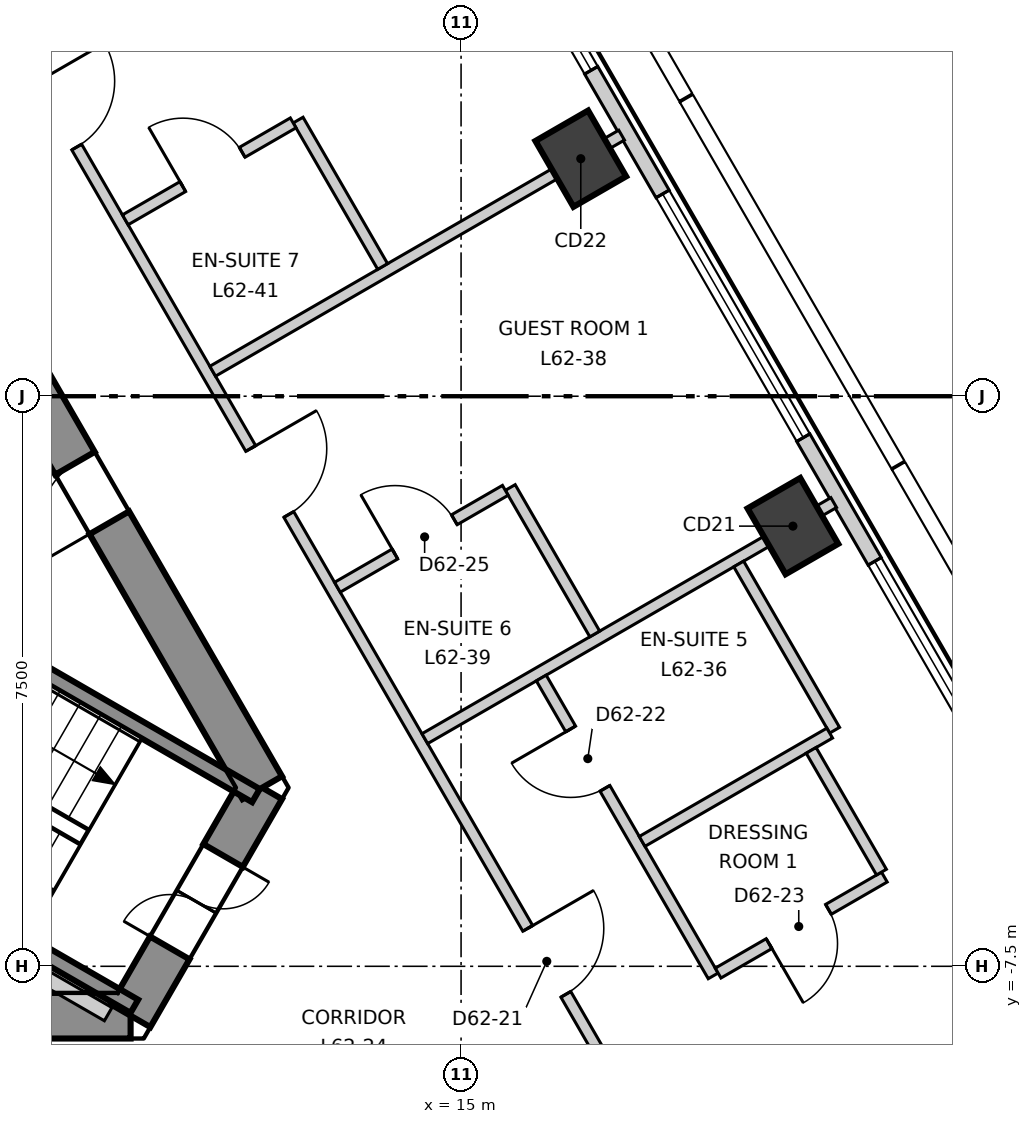
"""IFC4 building model, lengths in metres.
Left out: names, types, materials, properties, quantities, classifications, styles, units other than length and angle.
Written with IfcOpenShell. Run it as: python <this file> out.ifc"""

import sys

from ifc_helpers import new_model, si_unit, direction, frame, frame_2d, origin, origin_2d, place, context, subcontext, project, spatial, polyline, rectangle, outline, extrude, element, fill, save


model = new_model("IFC4")
c1 = context("Model", 3, precision=1e-05, world=origin(), true_north=direction((0.0, 1.0)))
c2 = subcontext(c1, "Body", "Model", "MODEL_VIEW")
j1 = project(units=[si_unit("LENGTHUNIT", "METRE"), si_unit("PLANEANGLEUNIT", "RADIAN")], contexts=[c1])
p1 = place(None, origin())
s1 = spatial("IfcSite", under=j1, at=p1, CompositionType="ELEMENT")
p2 = place(p1, origin())
s2 = spatial("IfcBuilding", under=s1, at=p2, CompositionType="ELEMENT")
p3 = place(p2, frame((0.0, 0.0, 268.3)))
s3 = spatial("IfcBuildingStorey", under=s2, at=p3, CompositionType="ELEMENT", Elevation=268.3)
p4 = place(p3, frame((-10.652, -8.15, -0.3), z_axis=(0.0, 0.0, 1.0), x_axis=(1.0, 0.0, 0.0)))
e1 = element("IfcWall", 1, at=p4, inside=s3, PredefinedType="SHEAR", context=c2, shape_type="SweptSolid", body=[
    extrude(outline(polyline([(-0.173, -0.3), (1.795, -0.3), (3.763, -0.3), (5.731, -0.3), (7.7, -0.3), (9.668, -0.3), (11.636, -0.3), (13.604, -0.3), (15.573, -0.3), (17.541, -0.3), (19.509, -0.3), (21.477, -0.3), (21.131, 0.3), (19.226, 0.3), (17.321, 0.3), (15.415, 0.3), (13.51, 0.3), (11.605, 0.3), (9.699, 0.3), (7.794, 0.3), (5.889, 0.3), (3.984, 0.3), (2.078, 0.3), (0.173, 0.3), (-0.173, -0.3)])), origin(), (0.0, 0.0, 1.0), 3.6),
])
p5 = place(p4, frame((9.752, 0.0, 0.3)))
e2 = element("IfcOpeningElement", 2, at=p5, cuts=e1, PredefinedType="OPENING", context=c2, shape_type="SweptSolid", body=[
    extrude(rectangle(XDim=1.8, YDim=2.1, at=frame_2d((0.9, 1.05))), frame((0.0, 0.31, 0.0), z_axis=(0.0, -1.0, 0.0), x_axis=(1.0, 0.0, 0.0)), (0.0, 0.0, 1.0), 0.62),
])
p6 = place(p4, frame((4.026, 0.0, 0.3)))
e3 = element("IfcOpeningElement", 3, at=p6, cuts=e1, PredefinedType="OPENING", context=c2, shape_type="SweptSolid", body=[
    extrude(rectangle(XDim=0.9, YDim=2.1, at=frame_2d((0.45, 1.05))), frame((0.0, 0.31, 0.0), z_axis=(0.0, -1.0, 0.0), x_axis=(1.0, 0.0, 0.0)), (0.0, 0.0, 1.0), 0.62),
])
p7 = place(p4, frame((16.198, 0.0, 0.3)))
e4 = element("IfcOpeningElement", 4, at=p7, cuts=e1, PredefinedType="OPENING", context=c2, shape_type="SweptSolid", body=[
    extrude(rectangle(XDim=1.0, YDim=2.1, at=frame_2d((0.5, 1.05))), frame((0.0, 0.31, 0.0), z_axis=(0.0, -1.0, 0.0), x_axis=(1.0, 0.0, 0.0)), (0.0, 0.0, 1.0), 0.62),
])
p8 = place(p3, frame((10.652, -8.15, -0.3), z_axis=(0.0, 0.0, 1.0), x_axis=(0.49997462182, 0.866040055388, 0.0)))
e5 = element("IfcWall", 5, at=p8, inside=s3, PredefinedType="SHEAR", context=c2, shape_type="SweptSolid", body=[
    extrude(outline(polyline([(-0.173, -0.3), (1.732, -0.301), (3.638, -0.301), (3.291, 0.3), (1.732, 0.3), (0.173, 0.3), (-0.173, -0.3)])), origin(), (0.0, 0.0, 1.0), 3.6),
])
p9 = place(p8, frame((1.032, 0.0, 0.3)))
e6 = element("IfcOpeningElement", 6, at=p9, cuts=e5, PredefinedType="OPENING", context=c2, shape_type="SweptSolid", body=[
    extrude(rectangle(XDim=1.4, YDim=2.1, at=frame_2d((0.7, 1.05))), frame((0.0, 0.31, 0.0), z_axis=(0.0, -1.0, 0.0), x_axis=(1.0, 0.0, 0.0)), (0.0, 0.0, 1.0), 0.621),
])
p10 = place(p3, frame((12.384, -5.15, -0.3), z_axis=(0.0, 0.0, 1.0), x_axis=(-0.500000539815, 0.866025092122, 0.0)))
e7 = element("IfcWall", 7, at=p10, inside=s3, PredefinedType="SHEAR", context=c2, shape_type="SweptSolid", body=[
    extrude(outline(polyline([(-0.173, -0.301), (1.795, -0.301), (3.763, -0.301), (5.731, -0.301), (7.7, -0.301), (9.668, -0.301), (11.636, -0.301), (13.604, -0.3), (15.573, -0.3), (17.541, -0.3), (19.509, -0.3), (21.477, -0.3), (21.131, 0.3), (19.226, 0.3), (17.321, 0.3), (15.415, 0.3), (13.51, 0.3), (11.605, 0.3), (9.699, 0.3), (7.794, 0.3), (5.889, 0.3), (3.984, 0.3), (2.078, 0.3), (0.173, 0.3), (-0.173, -0.301)])), origin(), (0.0, 0.0, 1.0), 3.6),
])
p11 = place(p10, frame((15.627, 0.0, 0.3)))
e8 = element("IfcOpeningElement", 8, at=p11, cuts=e7, PredefinedType="OPENING", context=c2, shape_type="SweptSolid", body=[
    extrude(rectangle(XDim=0.9, YDim=2.1, at=frame_2d((0.45, 1.05))), frame((0.0, 0.31, 0.0), z_axis=(0.0, -1.0, 0.0), x_axis=(1.0, 0.0, 0.0)), (0.0, 0.0, 1.0), 0.621),
])
p12 = place(p10, frame((4.026, 0.0, 0.3)))
e9 = element("IfcOpeningElement", 9, at=p12, cuts=e7, PredefinedType="OPENING", context=c2, shape_type="SweptSolid", body=[
    extrude(rectangle(XDim=0.9, YDim=2.1, at=frame_2d((0.45, 1.05))), frame((0.0, 0.31, 0.0), z_axis=(0.0, -1.0, 0.0), x_axis=(1.0, 0.0, 0.0)), (0.0, 0.0, 1.0), 0.621),
])
for number, where, z_axis, x_axis in (
    (10, (19.366, -1.709, -0.3), (0.0, 0.0, 1.0), (-0.5, 0.866, 0.0)),
    (11, (16.575, 3.125, -0.3), (0.0, 0.0, 1.0), (-0.5, 0.866, 0.0)),
):
    element("IfcColumn", number, at=place(p3, frame(where, z_axis=z_axis, x_axis=x_axis)), inside=s3, PredefinedType="COLUMN", context=c2, shape_type="SweptSolid", body=[
        extrude(rectangle(XDim=1.0, YDim=0.8, at=origin_2d()), origin(), (0.0, 0.0, 1.0), 3.6),
    ])
p13 = place(p3, frame((26.205, -12.154, 0.0), z_axis=(0.0, 0.0, 1.0), x_axis=(-0.49999909388, 0.866025926932, 0.0)))
e12 = element("IfcWall", 12, at=p13, inside=s3, PredefinedType="ELEMENTEDWALL", context=c2, shape_type="SweptSolid", body=[
    extrude(rectangle(XDim=47.236, YDim=0.2, at=frame_2d((23.618, 0.0))), origin(), (0.0, 0.0, 1.0), 3.3),
])
p14 = place(p13, frame((2.243, 0.0, 0.9)))
e13 = element("IfcOpeningElement", 13, at=p14, cuts=e12, PredefinedType="OPENING", context=c2, shape_type="SweptSolid", body=[
    extrude(rectangle(XDim=3.7, YDim=2.2, at=frame_2d((1.85, 1.1))), frame((0.0, 0.11, 0.0), z_axis=(0.0, -1.0, 0.0), x_axis=(1.0, 0.0, 0.0)), (0.0, 0.0, 1.0), 0.22),
])
p15 = place(p13, frame((7.825, 0.0, 0.9)))
e14 = element("IfcOpeningElement", 14, at=p15, cuts=e12, PredefinedType="OPENING", context=c2, shape_type="SweptSolid", body=[
    extrude(rectangle(XDim=3.7, YDim=2.2, at=frame_2d((1.85, 1.1))), frame((0.0, 0.11, 0.0), z_axis=(0.0, -1.0, 0.0), x_axis=(1.0, 0.0, 0.0)), (0.0, 0.0, 1.0), 0.22),
])
p16 = place(p13, frame((13.406, 0.0, 0.9)))
e15 = element("IfcOpeningElement", 15, at=p16, cuts=e12, PredefinedType="OPENING", context=c2, shape_type="SweptSolid", body=[
    extrude(rectangle(XDim=3.7, YDim=2.2, at=frame_2d((1.85, 1.1))), frame((0.0, 0.11, 0.0), z_axis=(0.0, -1.0, 0.0), x_axis=(1.0, 0.0, 0.0)), (0.0, 0.0, 1.0), 0.22),
])
p17 = place(p13, frame((18.987, 0.0, 0.9)))
e16 = element("IfcOpeningElement", 16, at=p17, cuts=e12, PredefinedType="OPENING", context=c2, shape_type="SweptSolid", body=[
    extrude(rectangle(XDim=3.7, YDim=2.2, at=frame_2d((1.85, 1.1))), frame((0.0, 0.11, 0.0), z_axis=(0.0, -1.0, 0.0), x_axis=(1.0, 0.0, 0.0)), (0.0, 0.0, 1.0), 0.22),
])
p18 = place(p13, frame((24.569, 0.0, 0.9)))
e17 = element("IfcOpeningElement", 17, at=p18, cuts=e12, PredefinedType="OPENING", context=c2, shape_type="SweptSolid", body=[
    extrude(rectangle(XDim=3.7, YDim=2.2, at=frame_2d((1.85, 1.1))), frame((0.0, 0.11, 0.0), z_axis=(0.0, -1.0, 0.0), x_axis=(1.0, 0.0, 0.0)), (0.0, 0.0, 1.0), 0.22),
])
p19 = place(p13, frame((30.15, 0.0, 0.9)))
e18 = element("IfcOpeningElement", 18, at=p19, cuts=e12, PredefinedType="OPENING", context=c2, shape_type="SweptSolid", body=[
    extrude(rectangle(XDim=3.7, YDim=2.2, at=frame_2d((1.85, 1.1))), frame((0.0, 0.11, 0.0), z_axis=(0.0, -1.0, 0.0), x_axis=(1.0, 0.0, 0.0)), (0.0, 0.0, 1.0), 0.22),
])
p20 = place(p13, frame((35.732, 0.0, 0.9)))
e19 = element("IfcOpeningElement", 19, at=p20, cuts=e12, PredefinedType="OPENING", context=c2, shape_type="SweptSolid", body=[
    extrude(rectangle(XDim=3.7, YDim=2.2, at=frame_2d((1.85, 1.1))), frame((0.0, 0.11, 0.0), z_axis=(0.0, -1.0, 0.0), x_axis=(1.0, 0.0, 0.0)), (0.0, 0.0, 1.0), 0.22),
])
p21 = place(p13, frame((41.313, 0.0, 0.9)))
e20 = element("IfcOpeningElement", 20, at=p21, cuts=e12, PredefinedType="OPENING", context=c2, shape_type="SweptSolid", body=[
    extrude(rectangle(XDim=3.7, YDim=2.2, at=frame_2d((1.85, 1.1))), frame((0.0, 0.11, 0.0), z_axis=(0.0, -1.0, 0.0), x_axis=(1.0, 0.0, 0.0)), (0.0, 0.0, 1.0), 0.22),
])
p22 = place(p3, frame((0.075, 20.37, 0.0), z_axis=(0.0, 0.0, 1.0), x_axis=(0.499988971979, -0.866031770721, 0.0)))
e21 = element("IfcWall", 21, at=p22, inside=s3, PredefinedType="PARTITIONING", context=c2, shape_type="SweptSolid", body=[
    extrude(rectangle(XDim=35.207, YDim=0.15, at=frame_2d((17.604, 0.0))), origin(), (0.0, 0.0, 1.0), 3.3),
])
p23 = place(p22, frame((31.606, 0.0, 0.0)))
e22 = element("IfcOpeningElement", 22, at=p23, cuts=e21, PredefinedType="OPENING", context=c2, shape_type="SweptSolid", body=[
    extrude(rectangle(XDim=1.0, YDim=2.1, at=frame_2d((0.5, 1.05))), frame((0.0, 0.085, 0.0), z_axis=(0.0, -1.0, 0.0), x_axis=(1.0, 0.0, 0.0)), (0.0, 0.0, 1.0), 0.17),
])
p24 = place(p22, frame((24.316, 0.0, 0.0)))
e23 = element("IfcOpeningElement", 23, at=p24, cuts=e21, PredefinedType="OPENING", context=c2, shape_type="SweptSolid", body=[
    extrude(rectangle(XDim=1.0, YDim=2.1, at=frame_2d((0.5, 1.05))), frame((0.0, 0.085, 0.0), z_axis=(0.0, -1.0, 0.0), x_axis=(1.0, 0.0, 0.0)), (0.0, 0.0, 1.0), 0.17),
])
p25 = place(p22, frame((18.735, 0.0, 0.0)))
e24 = element("IfcOpeningElement", 24, at=p25, cuts=e21, PredefinedType="OPENING", context=c2, shape_type="SweptSolid", body=[
    extrude(rectangle(XDim=1.0, YDim=2.1, at=frame_2d((0.5, 1.05))), frame((0.0, 0.085, 0.0), z_axis=(0.0, -1.0, 0.0), x_axis=(1.0, 0.0, 0.0)), (0.0, 0.0, 1.0), 0.17),
])
p26 = place(p22, frame((8.154, 0.0, 0.0)))
e25 = element("IfcOpeningElement", 25, at=p26, cuts=e21, PredefinedType="OPENING", context=c2, shape_type="SweptSolid", body=[
    extrude(rectangle(XDim=1.0, YDim=2.1, at=frame_2d((0.5, 1.05))), frame((0.0, 0.085, 0.0), z_axis=(0.0, -1.0, 0.0), x_axis=(1.0, 0.0, 0.0)), (0.0, 0.0, 1.0), 0.17),
])
p27 = place(p22, frame((13.754, 0.0, 0.0)))
e26 = element("IfcOpeningElement", 26, at=p27, cuts=e21, PredefinedType="OPENING", context=c2, shape_type="SweptSolid", body=[
    extrude(rectangle(XDim=0.9, YDim=2.1, at=frame_2d((0.45, 1.05))), frame((0.0, 0.085, 0.0), z_axis=(0.0, -1.0, 0.0), x_axis=(1.0, 0.0, 0.0)), (0.0, 0.0, 1.0), 0.17),
])
p28 = place(p22, frame((11.554, 0.0, 0.0)))
e27 = element("IfcOpeningElement", 27, at=p28, cuts=e21, PredefinedType="OPENING", context=c2, shape_type="SweptSolid", body=[
    extrude(rectangle(XDim=0.9, YDim=2.1, at=frame_2d((0.45, 1.05))), frame((0.0, 0.085, 0.0), z_axis=(0.0, -1.0, 0.0), x_axis=(1.0, 0.0, 0.0)), (0.0, 0.0, 1.0), 0.17),
])
p29 = place(p22, frame((2.69, 0.0, 0.0)))
e28 = element("IfcOpeningElement", 28, at=p29, cuts=e21, PredefinedType="OPENING", context=c2, shape_type="SweptSolid", body=[
    extrude(rectangle(XDim=1.0, YDim=2.1, at=frame_2d((0.5, 1.05))), frame((0.0, 0.085, 0.0), z_axis=(0.0, -1.0, 0.0), x_axis=(1.0, 0.0, 0.0)), (0.0, 0.0, 1.0), 0.17),
])
for number, where, z_axis, x_axis in (
    (29, (11.732, 0.329, 0.0), (0.0, 0.0, 1.0), (0.866, 0.5, 0.0)),
    (30, (14.523, -4.505, 0.0), (0.0, 0.0, 1.0), (0.866, 0.5, 0.0)),
):
    element("IfcWall", number, at=place(p3, frame(where, z_axis=z_axis, x_axis=x_axis)), inside=s3, PredefinedType="PARTITIONING", context=c2, shape_type="SweptSolid", body=[
        extrude(rectangle(XDim=6.212, YDim=0.15, at=frame_2d((3.106, 0.0))), origin(), (0.0, 0.0, 1.0), 3.3),
    ])
p30 = place(p3, frame((18.653, -2.207, 0.0), z_axis=(0.0, 0.0, 1.0), x_axis=(0.499789415832, -0.866146950478, 0.0)))
e31 = element("IfcWall", 31, at=p30, inside=s3, PredefinedType="PARTITIONING", context=c2, shape_type="SweptSolid", body=[
    extrude(rectangle(XDim=2.525, YDim=0.15, at=frame_2d((1.262, 0.0))), origin(), (0.0, 0.0, 1.0), 3.3),
])
p31 = place(p3, frame((16.055, -3.707, 0.0), z_axis=(0.0, 0.0, 1.0), x_axis=(0.499893710643, -0.866086761277, 0.0)))
e32 = element("IfcWall", 32, at=p31, inside=s3, PredefinedType="PARTITIONING", context=c2, shape_type="SweptSolid", body=[
    extrude(rectangle(XDim=4.525, YDim=0.15, at=frame_2d((2.262, 0.0))), origin(), (0.0, 0.0, 1.0), 3.3),
])
p32 = place(p31, frame((0.775, 0.0, 0.0)))
e33 = element("IfcOpeningElement", 33, at=p32, cuts=e32, PredefinedType="OPENING", context=c2, shape_type="SweptSolid", body=[
    extrude(rectangle(XDim=0.9, YDim=2.1, at=frame_2d((0.45, 1.05))), frame((0.0, 0.085, 0.0), z_axis=(0.0, -1.0, 0.0), x_axis=(1.0, 0.0, 0.0)), (0.0, 0.0, 1.0), 0.17),
])
p33 = place(p3, frame((12.856, 3.633, 0.0), z_axis=(0.0, 0.0, 1.0), x_axis=(0.500023359282, -0.866011916877, 0.0)))
e34 = element("IfcWall", 34, at=p33, inside=s3, PredefinedType="PARTITIONING", context=c2, shape_type="SweptSolid", body=[
    extrude(rectangle(XDim=2.224, YDim=0.15, at=frame_2d((1.112, 0.0))), origin(), (0.0, 0.0, 1.0), 3.3),
])
p34 = place(p3, frame((15.647, -1.201, 0.0), z_axis=(0.0, 0.0, 1.0), x_axis=(0.499833278392, -0.866121639155, 0.0)))
e35 = element("IfcWall", 35, at=p34, inside=s3, PredefinedType="PARTITIONING", context=c2, shape_type="SweptSolid", body=[
    extrude(rectangle(XDim=2.225, YDim=0.15, at=frame_2d((1.112, 0.0))), origin(), (0.0, 0.0, 1.0), 3.3),
])
p35 = place(p3, frame((10.582, 2.321, 0.0), z_axis=(0.0, 0.0, 1.0), x_axis=(0.866102706185, 0.499866084405, 0.0)))
e36 = element("IfcWall", 36, at=p35, inside=s3, PredefinedType="PARTITIONING", context=c2, shape_type="SweptSolid", body=[
    extrude(rectangle(XDim=2.551, YDim=0.15, at=frame_2d((1.275, 0.0))), origin(), (0.0, 0.0, 1.0), 3.3),
])
p36 = place(p35, frame((0.875, 0.0, 0.0)))
e37 = element("IfcOpeningElement", 37, at=p36, cuts=e36, PredefinedType="OPENING", context=c2, shape_type="SweptSolid", body=[
    extrude(rectangle(XDim=0.9, YDim=2.1, at=frame_2d((0.45, 1.05))), frame((0.0, 0.085, 0.0), z_axis=(0.0, -1.0, 0.0), x_axis=(1.0, 0.0, 0.0)), (0.0, 0.0, 1.0), 0.17),
])
p37 = place(p3, frame((13.373, -2.513, 0.0), z_axis=(0.0, 0.0, 1.0), x_axis=(0.866102706185, 0.499866084405, 0.0)))
e38 = element("IfcWall", 38, at=p37, inside=s3, PredefinedType="PARTITIONING", context=c2, shape_type="SweptSolid", body=[
    extrude(rectangle(XDim=2.551, YDim=0.15, at=frame_2d((1.275, 0.0))), origin(), (0.0, 0.0, 1.0), 3.3),
])
p38 = place(p37, frame((0.875, 0.0, 0.0)))
e39 = element("IfcOpeningElement", 39, at=p38, cuts=e38, PredefinedType="OPENING", context=c2, shape_type="SweptSolid", body=[
    extrude(rectangle(XDim=0.9, YDim=2.1, at=frame_2d((0.45, 1.05))), frame((0.0, 0.085, 0.0), z_axis=(0.0, -1.0, 0.0), x_axis=(1.0, 0.0, 0.0)), (0.0, 0.0, 1.0), 0.17),
])
p39 = place(p3, frame((17.382, -5.857, 0.0), z_axis=(0.0, 0.0, 1.0), x_axis=(0.866004402611, 0.500036373335, 0.0)))
e40 = element("IfcWall", 40, at=p39, inside=s3, PredefinedType="PARTITIONING", context=c2, shape_type="SweptSolid", body=[
    extrude(rectangle(XDim=2.85, YDim=0.15, at=frame_2d((1.425, 0.0))), origin(), (0.0, 0.0, 1.0), 3.3),
])
p40 = place(p3, frame((18.382, -7.589, 0.0), z_axis=(0.0, 0.0, 1.0), x_axis=(0.86593764446, 0.500151972811, 0.0)))
e41 = element("IfcWall", 41, at=p40, inside=s3, PredefinedType="PARTITIONING", context=c2, shape_type="SweptSolid", body=[
    extrude(rectangle(XDim=2.526, YDim=0.15, at=frame_2d((1.263, 0.0))), origin(), (0.0, 0.0, 1.0), 3.3),
])
p41 = place(p40, frame((0.775, 0.0, 0.0)))
e42 = element("IfcOpeningElement", 42, at=p41, cuts=e41, PredefinedType="OPENING", context=c2, shape_type="SweptSolid", body=[
    extrude(rectangle(XDim=0.9, YDim=2.1, at=frame_2d((0.45, 1.05))), frame((0.0, 0.085, 0.0), z_axis=(0.0, -1.0, 0.0), x_axis=(1.0, 0.0, 0.0)), (0.0, 0.0, 1.0), 0.17),
])
p42 = place(p3, frame((19.606, -4.659, 0.0), z_axis=(0.0, 0.0, 1.0), x_axis=(0.500042316284, -0.866000971088, 0.0)))
e43 = element("IfcWall", 43, at=p42, inside=s3, PredefinedType="PARTITIONING", context=c2, shape_type="SweptSolid", body=[
    extrude(rectangle(XDim=1.85, YDim=0.15, at=frame_2d((0.925, 0.0))), origin(), (0.0, 0.0, 1.0), 3.3),
])
p43 = place(p3, frame((4.9, -4.98, 0.0), z_axis=(0.0, 0.0, 1.0), x_axis=(0.866074613031, -0.499914757397, 0.0)))
e44 = element("IfcWall", 44, at=p43, inside=s3, PredefinedType="SOLIDWALL", context=c2, shape_type="SweptSolid", body=[
    extrude(rectangle(XDim=6.301, YDim=0.2, at=frame_2d((3.15, 0.0))), origin(), (0.0, 0.0, 1.0), 3.3),
])
p44 = place(p3, frame((4.929, -4.693, 0.0), z_axis=(0.0, 0.0, 1.0), x_axis=(0.866005022404, -0.500035299925, 0.0)))
e45 = element("IfcWall", 45, at=p44, inside=s3, PredefinedType="SOLIDWALL", context=c2, shape_type="SweptSolid", body=[
    extrude(rectangle(XDim=6.665, YDim=0.2, at=frame_2d((3.333, 0.0))), origin(), (0.0, 0.0, 1.0), 3.3),
])
p45 = place(p3, frame((6.529, -1.922, 0.0), z_axis=(0.0, 0.0, 1.0), x_axis=(0.866068467981, -0.499925403204, 0.0)))
e46 = element("IfcWall", 46, at=p45, inside=s3, PredefinedType="SOLIDWALL", context=c2, shape_type="SweptSolid", body=[
    extrude(rectangle(XDim=6.665, YDim=0.2, at=frame_2d((3.332, 0.0))), origin(), (0.0, 0.0, 1.0), 3.3),
])
p46 = place(p15, origin())
e47 = element("IfcWindow", 47, at=p46, inside=s3, PartitioningType="SINGLE_PANEL", PredefinedType="WINDOW", context=c2, shape_type="SweptSolid", body=[
    extrude(rectangle(XDim=3.7, YDim=2.2, at=frame_2d((1.85, 1.1))), frame((0.0, 0.03, 0.0), z_axis=(0.0, -1.0, 0.0), x_axis=(1.0, 0.0, 0.0)), (0.0, 0.0, 1.0), 0.06),
])
fill(e14, e47)
p47 = place(p16, origin())
e48 = element("IfcWindow", 48, at=p47, inside=s3, PartitioningType="SINGLE_PANEL", PredefinedType="WINDOW", context=c2, shape_type="SweptSolid", body=[
    extrude(rectangle(XDim=3.7, YDim=2.2, at=frame_2d((1.85, 1.1))), frame((0.0, 0.03, 0.0), z_axis=(0.0, -1.0, 0.0), x_axis=(1.0, 0.0, 0.0)), (0.0, 0.0, 1.0), 0.06),
])
fill(e15, e48)
p48 = place(p17, origin())
e49 = element("IfcWindow", 49, at=p48, inside=s3, PartitioningType="SINGLE_PANEL", PredefinedType="WINDOW", context=c2, shape_type="SweptSolid", body=[
    extrude(rectangle(XDim=3.7, YDim=2.2, at=frame_2d((1.85, 1.1))), frame((0.0, 0.03, 0.0), z_axis=(0.0, -1.0, 0.0), x_axis=(1.0, 0.0, 0.0)), (0.0, 0.0, 1.0), 0.06),
])
fill(e16, e49)
p49 = place(p23, origin())
e50 = element("IfcDoor", 50, at=p49, inside=s3, OperationType="SINGLE_SWING_RIGHT", PredefinedType="DOOR", context=c2, shape_type="SweptSolid", body=[
    extrude(rectangle(XDim=1.0, YDim=2.1, at=frame_2d((0.5, 1.05))), frame((0.0, 0.025, 0.0), z_axis=(0.0, -1.0, 0.0), x_axis=(1.0, 0.0, 0.0)), (0.0, 0.0, 1.0), 0.05),
])
fill(e22, e50)
p50 = place(p32, origin())
e51 = element("IfcDoor", 51, at=p50, inside=s3, OperationType="SINGLE_SWING_LEFT", PredefinedType="DOOR", context=c2, shape_type="SweptSolid", body=[
    extrude(rectangle(XDim=0.9, YDim=2.1, at=frame_2d((0.45, 1.05))), frame((0.0, 0.025, 0.0), z_axis=(0.0, -1.0, 0.0), x_axis=(1.0, 0.0, 0.0)), (0.0, 0.0, 1.0), 0.05),
])
fill(e33, e51)
p51 = place(p41, origin())
e52 = element("IfcDoor", 52, at=p51, inside=s3, OperationType="SINGLE_SWING_LEFT", PredefinedType="DOOR", context=c2, shape_type="SweptSolid", body=[
    extrude(rectangle(XDim=0.9, YDim=2.1, at=frame_2d((0.45, 1.05))), frame((0.0, 0.025, 0.0), z_axis=(0.0, -1.0, 0.0), x_axis=(1.0, 0.0, 0.0)), (0.0, 0.0, 1.0), 0.05),
])
fill(e42, e52)
p52 = place(p24, origin())
e53 = element("IfcDoor", 53, at=p52, inside=s3, OperationType="SINGLE_SWING_RIGHT", PredefinedType="DOOR", context=c2, shape_type="SweptSolid", body=[
    extrude(rectangle(XDim=1.0, YDim=2.1, at=frame_2d((0.5, 1.05))), frame((0.0, 0.025, 0.0), z_axis=(0.0, -1.0, 0.0), x_axis=(1.0, 0.0, 0.0)), (0.0, 0.0, 1.0), 0.05),
])
fill(e23, e53)
p53 = place(p38, origin())
e54 = element("IfcDoor", 54, at=p53, inside=s3, OperationType="SINGLE_SWING_RIGHT", PredefinedType="DOOR", context=c2, shape_type="SweptSolid", body=[
    extrude(rectangle(XDim=0.9, YDim=2.1, at=frame_2d((0.45, 1.05))), frame((0.0, 0.025, 0.0), z_axis=(0.0, -1.0, 0.0), x_axis=(1.0, 0.0, 0.0)), (0.0, 0.0, 1.0), 0.05),
])
fill(e39, e54)
p54 = place(p25, origin())
e55 = element("IfcDoor", 55, at=p54, inside=s3, OperationType="SINGLE_SWING_RIGHT", PredefinedType="DOOR", context=c2, shape_type="SweptSolid", body=[
    extrude(rectangle(XDim=1.0, YDim=2.1, at=frame_2d((0.5, 1.05))), frame((0.0, 0.025, 0.0), z_axis=(0.0, -1.0, 0.0), x_axis=(1.0, 0.0, 0.0)), (0.0, 0.0, 1.0), 0.05),
])
fill(e24, e55)
p55 = place(p36, origin())
e56 = element("IfcDoor", 56, at=p55, inside=s3, OperationType="SINGLE_SWING_RIGHT", PredefinedType="DOOR", context=c2, shape_type="SweptSolid", body=[
    extrude(rectangle(XDim=0.9, YDim=2.1, at=frame_2d((0.45, 1.05))), frame((0.0, 0.025, 0.0), z_axis=(0.0, -1.0, 0.0), x_axis=(1.0, 0.0, 0.0)), (0.0, 0.0, 1.0), 0.05),
])
fill(e37, e56)
p56 = place(p9, origin())
e57 = element("IfcDoor", 57, at=p56, inside=s3, OperationType="DOUBLE_DOOR_SINGLE_SWING", PredefinedType="DOOR", context=c2, shape_type="SweptSolid", body=[
    extrude(rectangle(XDim=1.4, YDim=2.1, at=frame_2d((0.7, 1.05))), frame((0.0, 0.025, 0.0), z_axis=(0.0, -1.0, 0.0), x_axis=(1.0, 0.0, 0.0)), (0.0, 0.0, 1.0), 0.05),
])
fill(e6, e57)
p57 = place(p12, origin())
e58 = element("IfcDoor", 58, at=p57, inside=s3, OperationType="SINGLE_SWING_RIGHT", PredefinedType="DOOR", context=c2, shape_type="SweptSolid", body=[
    extrude(rectangle(XDim=0.9, YDim=2.1, at=frame_2d((0.45, 1.05))), frame((0.0, 0.025, 0.0), z_axis=(0.0, -1.0, 0.0), x_axis=(1.0, 0.0, 0.0)), (0.0, 0.0, 1.0), 0.05),
])
fill(e9, e58)
save(model, sys.argv[1])
